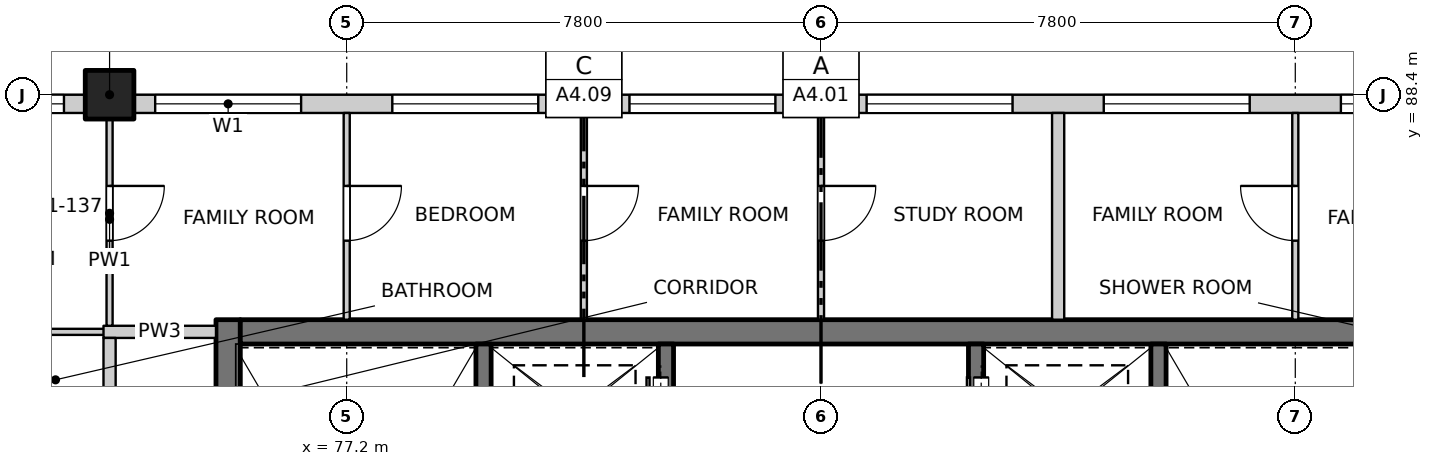
"""IFC4 building model, lengths in metres.
Left out: names, types, materials, properties, quantities, classifications, styles, units other than length and angle.
Written with IfcOpenShell. Run it as: python <this file> out.ifc"""

import sys

from ifc_helpers import new_model, si_unit, direction, frame, frame_2d, origin, origin_2d, place, context, subcontext, project, spatial, rectangle, extrude, element, fill, save


model = new_model("IFC4")
c1 = context("Model", 3, precision=1e-05, world=origin(), true_north=direction((0.0, 1.0)))
c2 = subcontext(c1, "Body", "Model", "MODEL_VIEW")
j1 = project(units=[si_unit("LENGTHUNIT", "METRE"), si_unit("PLANEANGLEUNIT", "RADIAN")], contexts=[c1])
p1 = place(None, origin())
s1 = spatial("IfcSite", under=j1, at=p1, CompositionType="ELEMENT")
p2 = place(p1, origin())
s2 = spatial("IfcBuilding", under=s1, at=p2, CompositionType="ELEMENT")
p3 = place(p2, frame((0.0, 0.0, 214.3)))
s3 = spatial("IfcBuildingStorey", under=s2, at=p3, CompositionType="ELEMENT", Elevation=214.3)
p4 = place(p3, frame((73.3, 88.4, -0.25), z_axis=(0.0, 0.0, 1.0), x_axis=(1.0, 0.0, 0.0)))
e1 = element("IfcColumn", 1, at=p4, inside=s3, PredefinedType="COLUMN", context=c2, shape_type="SweptSolid", body=[
    extrude(rectangle(XDim=0.8, YDim=0.8, at=origin_2d()), origin(), (0.0, 0.0, 1.0), 3.4),
])
p5 = place(p3, frame((75.25, 77.3, -0.25), z_axis=(0.0, 0.0, 1.0), x_axis=(0.0, 1.0, 0.0)))
e2 = element("IfcWall", 2, at=p5, inside=s3, PredefinedType="SOLIDWALL", context=c2, shape_type="SweptSolid", body=[
    extrude(rectangle(XDim=7.4, YDim=0.4, at=frame_2d((3.7, 0.0))), origin(), (0.0, 0.0, 1.0), 3.4),
])
p6 = place(p5, frame((0.3, 0.0, 0.25)))
e3 = element("IfcOpeningElement", 3, at=p6, cuts=e2, PredefinedType="OPENING", context=c2, shape_type="SweptSolid", body=[
    extrude(rectangle(XDim=1.2, YDim=2.1, at=frame_2d((0.6, 1.05))), frame((0.0, 0.21, 0.0), z_axis=(0.0, -1.0, 0.0), x_axis=(1.0, 0.0, 0.0)), (0.0, 0.0, 1.0), 0.42),
])
p7 = place(p3, frame((75.45, 84.5, -0.25), z_axis=(0.0, 0.0, 1.0), x_axis=(1.0, 0.0, 0.0)))
e4 = element("IfcWall", 4, at=p7, inside=s3, PredefinedType="SOLIDWALL", context=c2, shape_type="SweptSolid", body=[
    extrude(rectangle(XDim=19.1, YDim=0.4, at=frame_2d((9.55, 0.0))), origin(), (0.0, 0.0, 1.0), 3.4),
])
for number, where, z_axis, x_axis in (
    (5, (79.45, 77.3, -0.25), (0.0, 0.0, 1.0), (0.0, 1.0, 0.0)),
    (6, (90.55, 77.3, -0.25), (0.0, 0.0, 1.0), (0.0, 1.0, 0.0)),
):
    element("IfcWall", number, at=place(p3, frame(where, z_axis=z_axis, x_axis=x_axis)), inside=s3, PredefinedType="SOLIDWALL", context=c2, shape_type="SweptSolid", body=[
        extrude(rectangle(XDim=7.0, YDim=0.25, at=frame_2d((3.5, 0.0))), origin(), (0.0, 0.0, 1.0), 3.4),
    ])
p8 = place(p3, frame((82.45, 82.025, -0.25), z_axis=(0.0, 0.0, 1.0), x_axis=(0.0, 1.0, 0.0)))
e7 = element("IfcWall", 7, at=p8, inside=s3, PredefinedType="SOLIDWALL", context=c2, shape_type="SweptSolid", body=[
    extrude(rectangle(XDim=2.275, YDim=0.25, at=frame_2d((1.138, 0.0))), origin(), (0.0, 0.0, 1.0), 3.4),
])
p9 = place(p8, frame((0.625, 0.0, 0.25)))
e8 = element("IfcOpeningElement", 8, at=p9, cuts=e7, PredefinedType="OPENING", context=c2, shape_type="SweptSolid", body=[
    extrude(rectangle(XDim=1.1, YDim=2.1, at=frame_2d((0.55, 1.05))), frame((0.0, 0.135, 0.0), z_axis=(0.0, -1.0, 0.0), x_axis=(1.0, 0.0, 0.0)), (0.0, 0.0, 1.0), 0.27),
])
p10 = place(p3, frame((87.55, 82.025, -0.25), z_axis=(0.0, 0.0, 1.0), x_axis=(0.0, 1.0, 0.0)))
e9 = element("IfcWall", 9, at=p10, inside=s3, PredefinedType="SOLIDWALL", context=c2, shape_type="SweptSolid", body=[
    extrude(rectangle(XDim=2.275, YDim=0.25, at=frame_2d((1.138, 0.0))), origin(), (0.0, 0.0, 1.0), 3.4),
])
p11 = place(p10, frame((0.625, 0.0, 0.25)))
e10 = element("IfcOpeningElement", 10, at=p11, cuts=e9, PredefinedType="OPENING", context=c2, shape_type="SweptSolid", body=[
    extrude(rectangle(XDim=1.1, YDim=2.1, at=frame_2d((0.55, 1.05))), frame((0.0, 0.135, 0.0), z_axis=(0.0, -1.0, 0.0), x_axis=(1.0, 0.0, 0.0)), (0.0, 0.0, 1.0), 0.27),
])
p12 = place(p3, frame((65.5, 88.25, 0.0), z_axis=(0.0, 0.0, 1.0), x_axis=(1.0, 0.0, 0.0)))
e11 = element("IfcWall", 11, at=p12, inside=s3, PredefinedType="SOLIDWALL", context=c2, shape_type="SweptSolid", body=[
    extrude(rectangle(XDim=7.4, YDim=0.3, at=frame_2d((3.7, 0.0))), origin(), (0.0, 0.0, 1.0), 2.7),
])
p13 = place(p12, frame((0.75, 0.0, 0.9)))
e12 = element("IfcOpeningElement", 12, at=p13, cuts=e11, PredefinedType="OPENING", context=c2, shape_type="SweptSolid", body=[
    extrude(rectangle(XDim=2.4, YDim=1.8, at=frame_2d((1.2, 0.9))), frame((0.0, 0.16, 0.0), z_axis=(0.0, -1.0, 0.0), x_axis=(1.0, 0.0, 0.0)), (0.0, 0.0, 1.0), 0.32),
])
p14 = place(p12, frame((4.65, 0.0, 0.9)))
e13 = element("IfcOpeningElement", 13, at=p14, cuts=e11, PredefinedType="OPENING", context=c2, shape_type="SweptSolid", body=[
    extrude(rectangle(XDim=2.4, YDim=1.8, at=frame_2d((1.2, 0.9))), frame((0.0, 0.16, 0.0), z_axis=(0.0, -1.0, 0.0), x_axis=(1.0, 0.0, 0.0)), (0.0, 0.0, 1.0), 0.32),
])
p15 = place(p3, frame((73.7, 88.25, 0.0), z_axis=(0.0, 0.0, 1.0), x_axis=(1.0, 0.0, 0.0)))
e14 = element("IfcWall", 14, at=p15, inside=s3, PredefinedType="SOLIDWALL", context=c2, shape_type="SweptSolid", body=[
    extrude(rectangle(XDim=22.6, YDim=0.3, at=frame_2d((11.3, 0.0))), origin(), (0.0, 0.0, 1.0), 2.7),
])
p16 = place(p15, frame((0.35, 0.0, 0.9)))
e15 = element("IfcOpeningElement", 15, at=p16, cuts=e14, PredefinedType="OPENING", context=c2, shape_type="SweptSolid", body=[
    extrude(rectangle(XDim=2.4, YDim=1.8, at=frame_2d((1.2, 0.9))), frame((0.0, 0.16, 0.0), z_axis=(0.0, -1.0, 0.0), x_axis=(1.0, 0.0, 0.0)), (0.0, 0.0, 1.0), 0.32),
])
p17 = place(p15, frame((4.25, 0.0, 0.9)))
e16 = element("IfcOpeningElement", 16, at=p17, cuts=e14, PredefinedType="OPENING", context=c2, shape_type="SweptSolid", body=[
    extrude(rectangle(XDim=2.4, YDim=1.8, at=frame_2d((1.2, 0.9))), frame((0.0, 0.16, 0.0), z_axis=(0.0, -1.0, 0.0), x_axis=(1.0, 0.0, 0.0)), (0.0, 0.0, 1.0), 0.32),
])
p18 = place(p15, frame((8.15, 0.0, 0.9)))
e17 = element("IfcOpeningElement", 17, at=p18, cuts=e14, PredefinedType="OPENING", context=c2, shape_type="SweptSolid", body=[
    extrude(rectangle(XDim=2.4, YDim=1.8, at=frame_2d((1.2, 0.9))), frame((0.0, 0.16, 0.0), z_axis=(0.0, -1.0, 0.0), x_axis=(1.0, 0.0, 0.0)), (0.0, 0.0, 1.0), 0.32),
])
p19 = place(p15, frame((12.05, 0.0, 0.9)))
e18 = element("IfcOpeningElement", 18, at=p19, cuts=e14, PredefinedType="OPENING", context=c2, shape_type="SweptSolid", body=[
    extrude(rectangle(XDim=2.4, YDim=1.8, at=frame_2d((1.2, 0.9))), frame((0.0, 0.16, 0.0), z_axis=(0.0, -1.0, 0.0), x_axis=(1.0, 0.0, 0.0)), (0.0, 0.0, 1.0), 0.32),
])
p20 = place(p15, frame((15.95, 0.0, 0.9)))
e19 = element("IfcOpeningElement", 19, at=p20, cuts=e14, PredefinedType="OPENING", context=c2, shape_type="SweptSolid", body=[
    extrude(rectangle(XDim=2.4, YDim=1.8, at=frame_2d((1.2, 0.9))), frame((0.0, 0.16, 0.0), z_axis=(0.0, -1.0, 0.0), x_axis=(1.0, 0.0, 0.0)), (0.0, 0.0, 1.0), 0.32),
])
p21 = place(p15, frame((19.85, 0.0, 0.9)))
e20 = element("IfcOpeningElement", 20, at=p21, cuts=e14, PredefinedType="OPENING", context=c2, shape_type="SweptSolid", body=[
    extrude(rectangle(XDim=2.4, YDim=1.8, at=frame_2d((1.2, 0.9))), frame((0.0, 0.16, 0.0), z_axis=(0.0, -1.0, 0.0), x_axis=(1.0, 0.0, 0.0)), (0.0, 0.0, 1.0), 0.32),
])
p22 = place(p3, frame((61.9, 84.5, 0.0), z_axis=(0.0, 0.0, 1.0), x_axis=(1.0, 0.0, 0.0)))
e21 = element("IfcWall", 21, at=p22, inside=s3, PredefinedType="PARTITIONING", context=c2, shape_type="SweptSolid", body=[
    extrude(rectangle(XDim=11.5, YDim=0.1, at=frame_2d((5.75, 0.0))), origin(), (0.0, 0.0, 1.0), 3.15),
])
p23 = place(p22, frame((7.965, 0.0, 0.0)))
e22 = element("IfcOpeningElement", 22, at=p23, cuts=e21, PredefinedType="OPENING", context=c2, shape_type="SweptSolid", body=[
    extrude(rectangle(XDim=0.9, YDim=2.1, at=frame_2d((0.45, 1.05))), frame((0.0, 0.06, 0.0), z_axis=(0.0, -1.0, 0.0), x_axis=(1.0, 0.0, 0.0)), (0.0, 0.0, 1.0), 0.12),
])
p24 = place(p3, frame((73.2, 84.5, 0.0), z_axis=(0.0, 0.0, 1.0), x_axis=(1.0, 0.0, 0.0)))
e23 = element("IfcWall", 23, at=p24, inside=s3, PredefinedType="PARTITIONING", context=c2, shape_type="SweptSolid", body=[
    extrude(rectangle(XDim=1.85, YDim=0.2, at=frame_2d((0.925, 0.0))), origin(), (0.0, 0.0, 1.0), 3.15),
])
p25 = place(p3, frame((73.3, 49.5, 0.0), z_axis=(0.0, 0.0, 1.0), x_axis=(0.0, 1.0, 0.0)))
e24 = element("IfcWall", 24, at=p25, inside=s3, PredefinedType="PARTITIONING", context=c2, shape_type="SweptSolid", body=[
    extrude(rectangle(XDim=34.9, YDim=0.2, at=frame_2d((17.45, 0.0))), origin(), (0.0, 0.0, 1.0), 3.15),
])
p26 = place(p25, frame((3.325, 0.0, 0.0)))
e25 = element("IfcOpeningElement", 25, at=p26, cuts=e24, PredefinedType="OPENING", context=c2, shape_type="SweptSolid", body=[
    extrude(rectangle(XDim=1.0, YDim=2.1, at=frame_2d((0.5, 1.05))), frame((0.0, 0.11, 0.0), z_axis=(0.0, -1.0, 0.0), x_axis=(1.0, 0.0, 0.0)), (0.0, 0.0, 1.0), 0.22),
])
p27 = place(p25, frame((18.875, 0.0, 0.0)))
e26 = element("IfcOpeningElement", 26, at=p27, cuts=e24, PredefinedType="OPENING", context=c2, shape_type="SweptSolid", body=[
    extrude(rectangle(XDim=1.0, YDim=2.1, at=frame_2d((0.5, 1.05))), frame((0.0, 0.11, 0.0), z_axis=(0.0, -1.0, 0.0), x_axis=(1.0, 0.0, 0.0)), (0.0, 0.0, 1.0), 0.22),
])
p28 = place(p25, frame((29.325, 0.0, 0.0)))
e27 = element("IfcOpeningElement", 27, at=p28, cuts=e24, PredefinedType="OPENING", context=c2, shape_type="SweptSolid", body=[
    extrude(rectangle(XDim=1.0, YDim=2.1, at=frame_2d((0.5, 1.05))), frame((0.0, 0.11, 0.0), z_axis=(0.0, -1.0, 0.0), x_axis=(1.0, 0.0, 0.0)), (0.0, 0.0, 1.0), 0.22),
])
p29 = place(p3, frame((73.3, 84.6, 0.0), z_axis=(0.0, 0.0, 1.0), x_axis=(0.0, 1.0, 0.0)))
e28 = element("IfcWall", 28, at=p29, inside=s3, PredefinedType="PARTITIONING", context=c2, shape_type="SweptSolid", body=[
    extrude(rectangle(XDim=3.5, YDim=0.1, at=frame_2d((1.75, 0.0))), origin(), (0.0, 0.0, 1.0), 3.15),
])
p30 = place(p29, frame((1.4, 0.0, 0.0)))
e29 = element("IfcOpeningElement", 29, at=p30, cuts=e28, PredefinedType="OPENING", context=c2, shape_type="SweptSolid", body=[
    extrude(rectangle(XDim=0.9, YDim=2.1, at=frame_2d((0.45, 1.05))), frame((0.0, 0.06, 0.0), z_axis=(0.0, -1.0, 0.0), x_axis=(1.0, 0.0, 0.0)), (0.0, 0.0, 1.0), 0.12),
])
p31 = place(p3, frame((77.2, 84.7, 0.0), z_axis=(0.0, 0.0, 1.0), x_axis=(0.0, 1.0, 0.0)))
e30 = element("IfcWall", 30, at=p31, inside=s3, PredefinedType="PARTITIONING", context=c2, shape_type="SweptSolid", body=[
    extrude(rectangle(XDim=3.4, YDim=0.1, at=frame_2d((1.7, 0.0))), origin(), (0.0, 0.0, 1.0), 3.15),
])
p32 = place(p31, frame((1.3, 0.0, 0.0)))
e31 = element("IfcOpeningElement", 31, at=p32, cuts=e30, PredefinedType="OPENING", context=c2, shape_type="SweptSolid", body=[
    extrude(rectangle(XDim=0.9, YDim=2.1, at=frame_2d((0.45, 1.05))), frame((0.0, 0.06, 0.0), z_axis=(0.0, -1.0, 0.0), x_axis=(1.0, 0.0, 0.0)), (0.0, 0.0, 1.0), 0.12),
])
p33 = place(p3, frame((81.1, 84.7, 0.0), z_axis=(0.0, 0.0, 1.0), x_axis=(0.0, 1.0, 0.0)))
e32 = element("IfcWall", 32, at=p33, inside=s3, PredefinedType="PARTITIONING", context=c2, shape_type="SweptSolid", body=[
    extrude(rectangle(XDim=3.4, YDim=0.1, at=frame_2d((1.7, 0.0))), origin(), (0.0, 0.0, 1.0), 3.15),
])
p34 = place(p33, frame((1.3, 0.0, 0.0)))
e33 = element("IfcOpeningElement", 33, at=p34, cuts=e32, PredefinedType="OPENING", context=c2, shape_type="SweptSolid", body=[
    extrude(rectangle(XDim=0.9, YDim=2.1, at=frame_2d((0.45, 1.05))), frame((0.0, 0.06, 0.0), z_axis=(0.0, -1.0, 0.0), x_axis=(1.0, 0.0, 0.0)), (0.0, 0.0, 1.0), 0.12),
])
p35 = place(p3, frame((85.0, 84.7, 0.0), z_axis=(0.0, 0.0, 1.0), x_axis=(0.0, 1.0, 0.0)))
e34 = element("IfcWall", 34, at=p35, inside=s3, PredefinedType="PARTITIONING", context=c2, shape_type="SweptSolid", body=[
    extrude(rectangle(XDim=3.4, YDim=0.1, at=frame_2d((1.7, 0.0))), origin(), (0.0, 0.0, 1.0), 3.15),
])
p36 = place(p35, frame((1.3, 0.0, 0.0)))
e35 = element("IfcOpeningElement", 35, at=p36, cuts=e34, PredefinedType="OPENING", context=c2, shape_type="SweptSolid", body=[
    extrude(rectangle(XDim=0.9, YDim=2.1, at=frame_2d((0.45, 1.05))), frame((0.0, 0.06, 0.0), z_axis=(0.0, -1.0, 0.0), x_axis=(1.0, 0.0, 0.0)), (0.0, 0.0, 1.0), 0.12),
])
p37 = place(p3, frame((88.9, 84.7, 0.0), z_axis=(0.0, 0.0, 1.0), x_axis=(0.0, 1.0, 0.0)))
e36 = element("IfcWall", 36, at=p37, inside=s3, PredefinedType="PARTITIONING", context=c2, shape_type="SweptSolid", body=[
    extrude(rectangle(XDim=3.4, YDim=0.2, at=frame_2d((1.7, 0.0))), origin(), (0.0, 0.0, 1.0), 3.15),
])
p38 = place(p3, frame((92.8, 84.7, 0.0), z_axis=(0.0, 0.0, 1.0), x_axis=(0.0, 1.0, 0.0)))
e37 = element("IfcWall", 37, at=p38, inside=s3, PredefinedType="PARTITIONING", context=c2, shape_type="SweptSolid", body=[
    extrude(rectangle(XDim=3.4, YDim=0.1, at=frame_2d((1.7, 0.0))), origin(), (0.0, 0.0, 1.0), 3.15),
])
p39 = place(p38, frame((1.3, 0.0, 0.0)))
e38 = element("IfcOpeningElement", 38, at=p39, cuts=e37, PredefinedType="OPENING", context=c2, shape_type="SweptSolid", body=[
    extrude(rectangle(XDim=0.9, YDim=2.1, at=frame_2d((0.45, 1.05))), frame((0.0, 0.06, 0.0), z_axis=(0.0, -1.0, 0.0), x_axis=(1.0, 0.0, 0.0)), (0.0, 0.0, 1.0), 0.12),
])
p40 = place(p14, origin())
e39 = element("IfcWindow", 39, at=p40, inside=s3, PartitioningType="DOUBLE_PANEL_VERTICAL", PredefinedType="WINDOW", context=c2, shape_type="SweptSolid", body=[
    extrude(rectangle(XDim=2.4, YDim=1.8, at=frame_2d((1.2, 0.9))), frame((0.0, 0.03, 0.0), z_axis=(0.0, -1.0, 0.0), x_axis=(1.0, 0.0, 0.0)), (0.0, 0.0, 1.0), 0.06),
])
fill(e13, e39)
p41 = place(p16, origin())
e40 = element("IfcWindow", 40, at=p41, inside=s3, PartitioningType="DOUBLE_PANEL_VERTICAL", PredefinedType="WINDOW", context=c2, shape_type="SweptSolid", body=[
    extrude(rectangle(XDim=2.4, YDim=1.8, at=frame_2d((1.2, 0.9))), frame((0.0, 0.03, 0.0), z_axis=(0.0, -1.0, 0.0), x_axis=(1.0, 0.0, 0.0)), (0.0, 0.0, 1.0), 0.06),
])
fill(e15, e40)
p42 = place(p17, origin())
e41 = element("IfcWindow", 41, at=p42, inside=s3, PartitioningType="DOUBLE_PANEL_VERTICAL", PredefinedType="WINDOW", context=c2, shape_type="SweptSolid", body=[
    extrude(rectangle(XDim=2.4, YDim=1.8, at=frame_2d((1.2, 0.9))), frame((0.0, 0.03, 0.0), z_axis=(0.0, -1.0, 0.0), x_axis=(1.0, 0.0, 0.0)), (0.0, 0.0, 1.0), 0.06),
])
fill(e16, e41)
p43 = place(p18, origin())
e42 = element("IfcWindow", 42, at=p43, inside=s3, PartitioningType="DOUBLE_PANEL_VERTICAL", PredefinedType="WINDOW", context=c2, shape_type="SweptSolid", body=[
    extrude(rectangle(XDim=2.4, YDim=1.8, at=frame_2d((1.2, 0.9))), frame((0.0, 0.03, 0.0), z_axis=(0.0, -1.0, 0.0), x_axis=(1.0, 0.0, 0.0)), (0.0, 0.0, 1.0), 0.06),
])
fill(e17, e42)
p44 = place(p19, origin())
e43 = element("IfcWindow", 43, at=p44, inside=s3, PartitioningType="DOUBLE_PANEL_VERTICAL", PredefinedType="WINDOW", context=c2, shape_type="SweptSolid", body=[
    extrude(rectangle(XDim=2.4, YDim=1.8, at=frame_2d((1.2, 0.9))), frame((0.0, 0.03, 0.0), z_axis=(0.0, -1.0, 0.0), x_axis=(1.0, 0.0, 0.0)), (0.0, 0.0, 1.0), 0.06),
])
fill(e18, e43)
p45 = place(p20, origin())
e44 = element("IfcWindow", 44, at=p45, inside=s3, PartitioningType="DOUBLE_PANEL_VERTICAL", PredefinedType="WINDOW", context=c2, shape_type="SweptSolid", body=[
    extrude(rectangle(XDim=2.4, YDim=1.8, at=frame_2d((1.2, 0.9))), frame((0.0, 0.03, 0.0), z_axis=(0.0, -1.0, 0.0), x_axis=(1.0, 0.0, 0.0)), (0.0, 0.0, 1.0), 0.06),
])
fill(e19, e44)
p46 = place(p21, origin())
e45 = element("IfcWindow", 45, at=p46, inside=s3, PartitioningType="DOUBLE_PANEL_VERTICAL", PredefinedType="WINDOW", context=c2, shape_type="SweptSolid", body=[
    extrude(rectangle(XDim=2.4, YDim=1.8, at=frame_2d((1.2, 0.9))), frame((0.0, 0.03, 0.0), z_axis=(0.0, -1.0, 0.0), x_axis=(1.0, 0.0, 0.0)), (0.0, 0.0, 1.0), 0.06),
])
fill(e20, e45)
p47 = place(p9, origin())
e46 = element("IfcDoor", 46, at=p47, inside=s3, OperationType="SLIDING_TO_RIGHT", PredefinedType="DOOR", context=c2, shape_type="SweptSolid", body=[
    extrude(rectangle(XDim=1.1, YDim=2.1, at=frame_2d((0.55, 1.05))), frame((0.0, 0.11, 0.0), z_axis=(0.0, -1.0, 0.0), x_axis=(1.0, 0.0, 0.0)), (0.0, 0.0, 1.0), 0.05),
])
fill(e8, e46)
p48 = place(p11, origin())
e47 = element("IfcDoor", 47, at=p48, inside=s3, OperationType="SLIDING_TO_RIGHT", PredefinedType="DOOR", context=c2, shape_type="SweptSolid", body=[
    extrude(rectangle(XDim=1.1, YDim=2.1, at=frame_2d((0.55, 1.05))), frame((0.0, -0.06, 0.0), z_axis=(0.0, -1.0, 0.0), x_axis=(1.0, 0.0, 0.0)), (0.0, 0.0, 1.0), 0.05),
])
fill(e10, e47)
p49 = place(p30, origin())
e48 = element("IfcDoor", 48, at=p49, inside=s3, OperationType="SINGLE_SWING_LEFT", PredefinedType="DOOR", context=c2, shape_type="SweptSolid", body=[
    extrude(rectangle(XDim=0.9, YDim=2.1, at=frame_2d((0.45, 1.05))), frame((0.0, 0.025, 0.0), z_axis=(0.0, -1.0, 0.0), x_axis=(1.0, 0.0, 0.0)), (0.0, 0.0, 1.0), 0.05),
])
fill(e29, e48)
p50 = place(p32, origin())
e49 = element("IfcDoor", 49, at=p50, inside=s3, OperationType="SINGLE_SWING_LEFT", PredefinedType="DOOR", context=c2, shape_type="SweptSolid", body=[
    extrude(rectangle(XDim=0.9, YDim=2.1, at=frame_2d((0.45, 1.05))), frame((0.0, 0.025, 0.0), z_axis=(0.0, -1.0, 0.0), x_axis=(1.0, 0.0, 0.0)), (0.0, 0.0, 1.0), 0.05),
])
fill(e31, e49)
p51 = place(p34, origin())
e50 = element("IfcDoor", 50, at=p51, inside=s3, OperationType="SINGLE_SWING_LEFT", PredefinedType="DOOR", context=c2, shape_type="SweptSolid", body=[
    extrude(rectangle(XDim=0.9, YDim=2.1, at=frame_2d((0.45, 1.05))), frame((0.0, 0.025, 0.0), z_axis=(0.0, -1.0, 0.0), x_axis=(1.0, 0.0, 0.0)), (0.0, 0.0, 1.0), 0.05),
])
fill(e33, e50)
p52 = place(p36, origin())
e51 = element("IfcDoor", 51, at=p52, inside=s3, OperationType="SINGLE_SWING_LEFT", PredefinedType="DOOR", context=c2, shape_type="SweptSolid", body=[
    extrude(rectangle(XDim=0.9, YDim=2.1, at=frame_2d((0.45, 1.05))), frame((0.0, 0.025, 0.0), z_axis=(0.0, -1.0, 0.0), x_axis=(1.0, 0.0, 0.0)), (0.0, 0.0, 1.0), 0.05),
])
fill(e35, e51)
p53 = place(p39, origin())
e52 = element("IfcDoor", 52, at=p53, inside=s3, OperationType="SINGLE_SWING_RIGHT", PredefinedType="DOOR", context=c2, shape_type="SweptSolid", body=[
    extrude(rectangle(XDim=0.9, YDim=2.1, at=frame_2d((0.45, 1.05))), frame((0.0, 0.025, 0.0), z_axis=(0.0, -1.0, 0.0), x_axis=(1.0, 0.0, 0.0)), (0.0, 0.0, 1.0), 0.05),
])
fill(e38, e52)
save(model, sys.argv[1])
